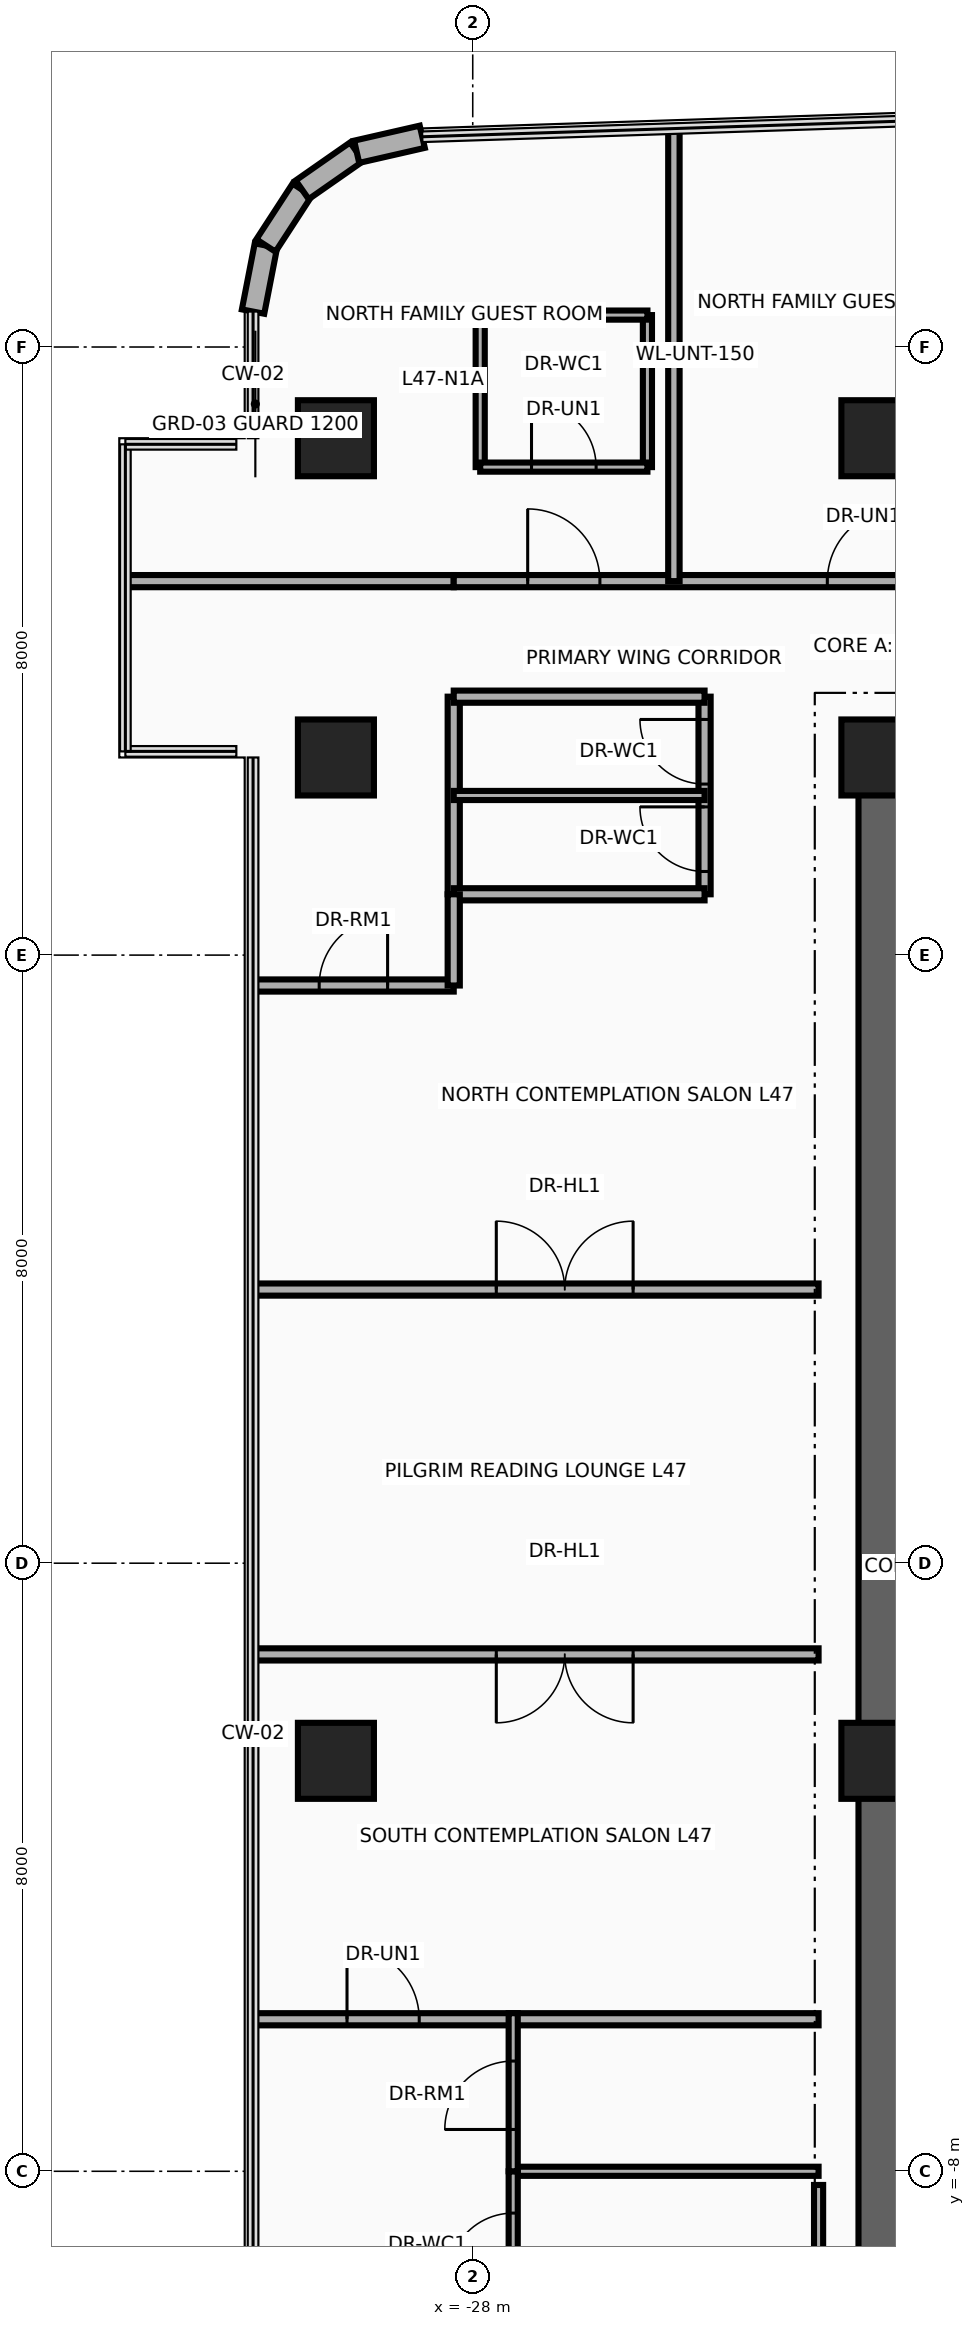
"""IFC4 building model, lengths in metres.
Left out: names, types, materials, properties, quantities, classifications, styles, units other than length and angle.
Written with IfcOpenShell. Run it as: python <this file> out.ifc"""

import sys

from ifc_helpers import new_model, si_unit, direction, frame, frame_2d, origin, origin_2d, place, context, subcontext, project, spatial, rectangle, extrude, source, transform, mapped, element, fill, save


model = new_model("IFC4")
c1 = context("Model", 3, precision=1e-05, world=origin(), true_north=direction((0.0, 1.0)))
c2 = subcontext(c1, "Body", "Model", "MODEL_VIEW")
j1 = project(units=[si_unit("LENGTHUNIT", "METRE"), si_unit("PLANEANGLEUNIT", "RADIAN")], contexts=[c1])
p1 = place(None, origin())
s1 = spatial("IfcSite", under=j1, at=p1, CompositionType="ELEMENT")
p2 = place(p1, origin())
s2 = spatial("IfcBuilding", under=s1, at=p2, CompositionType="ELEMENT")
p3 = place(p2, frame((0.0, 0.0, 184.45)))
s3 = spatial("IfcBuildingStorey", under=s2, at=p3, CompositionType="ELEMENT", Elevation=184.45)
p4 = place(p3, frame((-22.65, -11.075, 0.0), z_axis=(0.0, 0.0, 1.0), x_axis=(0.0, 1.0, 0.0)))
e1 = element("IfcWall", 1, at=p4, inside=s3, PredefinedType="SHEAR", context=c2, shape_type="SweptSolid", body=[
    extrude(rectangle(XDim=22.15, YDim=0.55, at=frame_2d((11.075, 0.0))), origin(), (0.0, 0.0, 1.0), 3.63),
])
p5 = place(p3, frame((-22.65, 10.8, 0.0), z_axis=(0.0, 0.0, 1.0), x_axis=(1.0, 0.0, 0.0)))
e2 = element("IfcWall", 2, at=p5, inside=s3, PredefinedType="SHEAR", context=c2, shape_type="SweptSolid", body=[
    extrude(rectangle(XDim=10.25, YDim=0.55, at=frame_2d((5.125, 0.0))), origin(), (0.0, 0.0, 1.0), 3.63),
])
m1 = source(origin(), c2, "Body", "SweptSolid", [
    extrude(rectangle(XDim=1.0, YDim=1.0, at=origin_2d()), origin(), (0.0, 0.0, 1.0), 3.95),
])
for number, where, z_axis, x_axis in (
    (3, (-29.8, -2.6, 0.0), (0.0, 0.0, 1.0), (1.0, 0.0, 0.0)),
    (4, (-22.65, -2.6, 0.0), (0.0, 0.0, 1.0), (1.0, 0.0, 0.0)),
    (5, (-29.8, 10.6, 0.0), (0.0, 0.0, 1.0), (1.0, 0.0, 0.0)),
    (6, (-22.65, 10.6, 0.0), (0.0, 0.0, 1.0), (1.0, 0.0, 0.0)),
    (7, (-29.8, 14.8, 0.0), (0.0, 0.0, 1.0), (1.0, 0.0, 0.0)),
    (8, (-22.65, 14.8, 0.0), (0.0, 0.0, 1.0), (1.0, 0.0, 0.0)),
):
    element("IfcColumn", number, at=place(p3, frame(where, z_axis=z_axis, x_axis=x_axis)), inside=s3, PredefinedType="COLUMN", context=c2, shape_type="MappedRepresentation", body=[
        mapped(m1, transform((0.0, 0.0, 0.0), x_axis=(1.0, 0.0, 0.0), y_axis=(0.0, 1.0, 0.0), z_axis=(0.0, 0.0, 1.0), scale=1.0)),
    ])
p6 = place(p3, frame((-30.89, 16.466, 0.0), z_axis=(0.0, 0.0, 1.0), x_axis=(0.191128020887, 0.981565117367, 0.0)))
e9 = element("IfcWall", 9, at=p6, inside=s3, PredefinedType="SOLIDWALL", context=c2, shape_type="SweptSolid", body=[
    extrude(rectangle(XDim=0.885, YDim=0.3, at=frame_2d((0.443, 0.0))), origin(), (0.0, 0.0, 1.0), 3.63),
])
p7 = place(p3, frame((-30.721, 17.335, 0.0), z_axis=(0.0, 0.0, 1.0), x_axis=(0.545322000684, 0.838226649284, 0.0)))
e10 = element("IfcWall", 10, at=p7, inside=s3, PredefinedType="SOLIDWALL", context=c2, shape_type="SweptSolid", body=[
    extrude(rectangle(XDim=0.874, YDim=0.3, at=frame_2d((0.437, 0.0))), origin(), (0.0, 0.0, 1.0), 3.63),
])
p8 = place(p3, frame((-30.244, 18.068, 0.0), z_axis=(0.0, 0.0, 1.0), x_axis=(0.820005059444, 0.572356272339, 0.0)))
e11 = element("IfcWall", 11, at=p8, inside=s3, PredefinedType="SOLIDWALL", context=c2, shape_type="SweptSolid", body=[
    extrude(rectangle(XDim=0.875, YDim=0.3, at=frame_2d((0.437, 0.0))), origin(), (0.0, 0.0, 1.0), 3.63),
])
p9 = place(p3, frame((-29.527, 18.569, 0.0), z_axis=(0.0, 0.0, 1.0), x_axis=(0.974798570829, 0.223086858218, 0.0)))
e12 = element("IfcWall", 12, at=p9, inside=s3, PredefinedType="SOLIDWALL", context=c2, shape_type="SweptSolid", body=[
    extrude(rectangle(XDim=0.885, YDim=0.3, at=frame_2d((0.443, 0.0))), origin(), (0.0, 0.0, 1.0), 3.63),
])
p10 = place(p3, frame((-28.25, 8.8, 0.0), z_axis=(0.0, 0.0, 1.0), x_axis=(0.0, 1.0, 0.0)))
e13 = element("IfcWall", 13, at=p10, inside=s3, PredefinedType="PARTITIONING", context=c2, shape_type="SweptSolid", body=[
    extrude(rectangle(XDim=2.6, YDim=0.16, at=frame_2d((1.3, 0.0))), origin(), (0.0, 0.0, 1.0), 2.665),
])
p11 = place(p3, frame((-24.95, 8.8, 0.0), z_axis=(0.0, 0.0, 1.0), x_axis=(0.0, 1.0, 0.0)))
e14 = element("IfcWall", 14, at=p11, inside=s3, PredefinedType="PARTITIONING", context=c2, shape_type="SweptSolid", body=[
    extrude(rectangle(XDim=2.6, YDim=0.16, at=frame_2d((1.3, 0.0))), origin(), (0.0, 0.0, 1.0), 2.665),
])
p12 = place(p11, frame((0.3, 0.0, 0.0)))
e15 = element("IfcOpeningElement", 15, at=p12, cuts=e14, PredefinedType="OPENING", context=c2, shape_type="SweptSolid", body=[
    extrude(rectangle(XDim=0.85, YDim=2.1, at=frame_2d((0.425, 1.05))), frame((0.0, 0.095, 0.0), z_axis=(0.0, -1.0, 0.0), x_axis=(1.0, 0.0, 0.0)), (0.0, 0.0, 1.0), 0.19),
])
p13 = place(p11, frame((1.45, 0.0, 0.0)))
e16 = element("IfcOpeningElement", 16, at=p13, cuts=e14, PredefinedType="OPENING", context=c2, shape_type="SweptSolid", body=[
    extrude(rectangle(XDim=0.85, YDim=2.1, at=frame_2d((0.425, 1.05))), frame((0.0, 0.095, 0.0), z_axis=(0.0, -1.0, 0.0), x_axis=(1.0, 0.0, 0.0)), (0.0, 0.0, 1.0), 0.19),
])
for number, where, z_axis, x_axis in (
    (17, (-28.25, 8.8, 0.0), (0.0, 0.0, 1.0), (1.0, 0.0, 0.0)),
    (18, (-28.25, 11.4, 0.0), (0.0, 0.0, 1.0), (1.0, 0.0, 0.0)),
):
    element("IfcWall", number, at=place(p3, frame(where, z_axis=z_axis, x_axis=x_axis)), inside=s3, PredefinedType="PARTITIONING", context=c2, shape_type="SweptSolid", body=[
        extrude(rectangle(XDim=3.3, YDim=0.16, at=frame_2d((1.65, 0.0))), origin(), (0.0, 0.0, 1.0), 3.63),
    ])
p14 = place(p3, frame((-28.25, 10.1, 0.0), z_axis=(0.0, 0.0, 1.0), x_axis=(1.0, 0.0, 0.0)))
e19 = element("IfcWall", 19, at=p14, inside=s3, PredefinedType="PARTITIONING", context=c2, shape_type="SweptSolid", body=[
    extrude(rectangle(XDim=3.3, YDim=0.12, at=frame_2d((1.65, 0.0))), origin(), (0.0, 0.0, 1.0), 3.63),
])
p15 = place(p3, frame((-30.89, -6.0, 0.0), z_axis=(0.0, 0.0, 1.0), x_axis=(1.0, 0.0, 0.0)))
e20 = element("IfcWall", 20, at=p15, inside=s3, PredefinedType="PARTITIONING", context=c2, shape_type="SweptSolid", body=[
    extrude(rectangle(XDim=7.44, YDim=0.16, at=frame_2d((3.72, 0.0))), origin(), (0.0, 0.0, 1.0), 3.076),
])
p16 = place(p15, frame((1.236, 0.0, 0.0)))
e21 = element("IfcOpeningElement", 21, at=p16, cuts=e20, PredefinedType="OPENING", context=c2, shape_type="SweptSolid", body=[
    extrude(rectangle(XDim=0.95, YDim=2.15, at=frame_2d((0.475, 1.075))), frame((0.0, 0.095, 0.0), z_axis=(0.0, -1.0, 0.0), x_axis=(1.0, 0.0, 0.0)), (0.0, 0.0, 1.0), 0.19),
])
p17 = place(p3, frame((-30.89, 7.6, 0.0), z_axis=(0.0, 0.0, 1.0), x_axis=(1.0, 0.0, 0.0)))
e22 = element("IfcWall", 22, at=p17, inside=s3, PredefinedType="PARTITIONING", context=c2, shape_type="SweptSolid", body=[
    extrude(rectangle(XDim=2.64, YDim=0.16, at=frame_2d((1.32, 0.0))), origin(), (0.0, 0.0, 1.0), 3.076),
])
p18 = place(p17, frame((0.87, 0.0, 0.0)))
e23 = element("IfcOpeningElement", 23, at=p18, cuts=e22, PredefinedType="OPENING", context=c2, shape_type="SweptSolid", body=[
    extrude(rectangle(XDim=0.9, YDim=2.1, at=frame_2d((0.45, 1.05))), frame((0.0, 0.095, 0.0), z_axis=(0.0, -1.0, 0.0), x_axis=(1.0, 0.0, 0.0)), (0.0, 0.0, 1.0), 0.19),
])
p19 = place(p3, frame((-28.25, 7.6, 0.0), z_axis=(0.0, 0.0, 1.0), x_axis=(0.0, 1.0, 0.0)))
e24 = element("IfcWall", 24, at=p19, inside=s3, PredefinedType="PARTITIONING", context=c2, shape_type="SweptSolid", body=[
    extrude(rectangle(XDim=1.2, YDim=0.16, at=frame_2d((0.6, 0.0))), origin(), (0.0, 0.0, 1.0), 3.158),
])
p20 = place(p3, frame((-27.468, -8.0, 0.0), z_axis=(0.0, 0.0, 1.0), x_axis=(1.0, 0.0, 0.0)))
e25 = element("IfcWall", 25, at=p20, inside=s3, PredefinedType="PARTITIONING", context=c2, shape_type="SweptSolid", body=[
    extrude(rectangle(XDim=4.018, YDim=0.12, at=frame_2d((2.009, 0.0))), origin(), (0.0, 0.0, 1.0), 3.63),
])
p21 = place(p3, frame((-27.468, -9.95, 0.0), z_axis=(0.0, 0.0, 1.0), x_axis=(0.0, 1.0, 0.0)))
e26 = element("IfcWall", 26, at=p21, inside=s3, PredefinedType="PARTITIONING", context=c2, shape_type="SweptSolid", body=[
    extrude(rectangle(XDim=1.95, YDim=0.12, at=frame_2d((0.975, 0.0))), origin(), (0.0, 0.0, 1.0), 3.158),
])
p22 = place(p21, frame((0.55, 0.0, 0.0)))
e27 = element("IfcOpeningElement", 27, at=p22, cuts=e26, PredefinedType="OPENING", context=c2, shape_type="SweptSolid", body=[
    extrude(rectangle(XDim=0.85, YDim=2.1, at=frame_2d((0.425, 1.05))), frame((0.0, 0.075, 0.0), z_axis=(0.0, -1.0, 0.0), x_axis=(1.0, 0.0, 0.0)), (0.0, 0.0, 1.0), 0.15),
])
p23 = place(p3, frame((-27.468, -8.0, 0.0), z_axis=(0.0, 0.0, 1.0), x_axis=(0.0, 1.0, 0.0)))
e28 = element("IfcWall", 28, at=p23, inside=s3, PredefinedType="PARTITIONING", context=c2, shape_type="SweptSolid", body=[
    extrude(rectangle(XDim=2.08, YDim=0.12, at=frame_2d((1.04, 0.0))), origin(), (0.0, 0.0, 1.0), 3.158),
])
p24 = place(p23, frame((0.55, 0.0, 0.0)))
e29 = element("IfcOpeningElement", 29, at=p24, cuts=e28, PredefinedType="OPENING", context=c2, shape_type="SweptSolid", body=[
    extrude(rectangle(XDim=0.9, YDim=2.1, at=frame_2d((0.45, 1.05))), frame((0.0, 0.075, 0.0), z_axis=(0.0, -1.0, 0.0), x_axis=(1.0, 0.0, 0.0)), (0.0, 0.0, 1.0), 0.15),
])
p25 = place(p3, frame((-23.45, -9.77, 0.0), z_axis=(0.0, 0.0, 1.0), x_axis=(0.0, 1.0, 0.0)))
e30 = element("IfcWall", 30, at=p25, inside=s3, PredefinedType="PARTITIONING", context=c2, shape_type="SweptSolid", body=[
    extrude(rectangle(XDim=1.59, YDim=0.12, at=frame_2d((0.795, 0.0))), origin(), (0.0, 0.0, 1.0), 3.158),
])
p26 = place(p3, frame((-30.89, -1.2, 0.0), z_axis=(0.0, 0.0, 1.0), x_axis=(1.0, 0.0, 0.0)))
e31 = element("IfcWall", 31, at=p26, inside=s3, PredefinedType="PARTITIONING", context=c2, shape_type="SweptSolid", body=[
    extrude(rectangle(XDim=7.44, YDim=0.16, at=frame_2d((3.72, 0.0))), origin(), (0.0, 0.0, 1.0), 3.076),
])
p27 = place(p26, frame((3.2, 0.0, 0.0)))
e32 = element("IfcOpeningElement", 32, at=p27, cuts=e31, PredefinedType="OPENING", context=c2, shape_type="SweptSolid", body=[
    extrude(rectangle(XDim=1.8, YDim=2.15, at=frame_2d((0.9, 1.075))), frame((0.0, 0.095, 0.0), z_axis=(0.0, -1.0, 0.0), x_axis=(1.0, 0.0, 0.0)), (0.0, 0.0, 1.0), 0.19),
])
p28 = place(p3, frame((-30.89, 3.6, 0.0), z_axis=(0.0, 0.0, 1.0), x_axis=(1.0, 0.0, 0.0)))
e33 = element("IfcWall", 33, at=p28, inside=s3, PredefinedType="PARTITIONING", context=c2, shape_type="SweptSolid", body=[
    extrude(rectangle(XDim=7.44, YDim=0.16, at=frame_2d((3.72, 0.0))), origin(), (0.0, 0.0, 1.0), 3.076),
])
p29 = place(p28, frame((3.2, 0.0, 0.0)))
e34 = element("IfcOpeningElement", 34, at=p29, cuts=e33, PredefinedType="OPENING", context=c2, shape_type="SweptSolid", body=[
    extrude(rectangle(XDim=1.8, YDim=2.15, at=frame_2d((0.9, 1.075))), frame((0.0, 0.095, 0.0), z_axis=(0.0, -1.0, 0.0), x_axis=(1.0, 0.0, 0.0)), (0.0, 0.0, 1.0), 0.19),
])
p30 = place(p3, frame((-32.54, 12.92, 0.0), z_axis=(0.0, 0.0, 1.0), x_axis=(1.0, 0.0, 0.0)))
e35 = element("IfcWall", 35, at=p30, inside=s3, PredefinedType="PARTITIONING", context=c2, shape_type="SweptSolid", body=[
    extrude(rectangle(XDim=4.29, YDim=0.16, at=frame_2d((2.145, 0.0))), origin(), (0.0, 0.0, 1.0), 3.076),
])
p31 = place(p3, frame((-28.25, 12.92, 0.0), z_axis=(0.0, 0.0, 1.0), x_axis=(1.0, 0.0, 0.0)))
e36 = element("IfcWall", 36, at=p31, inside=s3, PredefinedType="PARTITIONING", context=c2, shape_type="SweptSolid", body=[
    extrude(rectangle(XDim=36.75, YDim=0.16, at=frame_2d((18.375, 0.0))), origin(), (0.0, 0.0, 1.0), 2.615),
])
p32 = place(p31, frame((0.973, 0.0, 0.0)))
e37 = element("IfcOpeningElement", 37, at=p32, cuts=e36, PredefinedType="OPENING", context=c2, shape_type="SweptSolid", body=[
    extrude(rectangle(XDim=0.95, YDim=2.15, at=frame_2d((0.475, 1.075))), frame((0.0, 0.095, 0.0), z_axis=(0.0, -1.0, 0.0), x_axis=(1.0, 0.0, 0.0)), (0.0, 0.0, 1.0), 0.19),
])
p33 = place(p31, frame((4.915, 0.0, 0.0)))
e38 = element("IfcOpeningElement", 38, at=p33, cuts=e36, PredefinedType="OPENING", context=c2, shape_type="SweptSolid", body=[
    extrude(rectangle(XDim=0.95, YDim=2.15, at=frame_2d((0.475, 1.075))), frame((0.0, 0.095, 0.0), z_axis=(0.0, -1.0, 0.0), x_axis=(1.0, 0.0, 0.0)), (0.0, 0.0, 1.0), 0.19),
])
p34 = place(p31, frame((13.5, 0.0, 0.0)))
e39 = element("IfcOpeningElement", 39, at=p34, cuts=e36, PredefinedType="OPENING", context=c2, shape_type="SweptSolid", body=[
    extrude(rectangle(XDim=0.95, YDim=2.15, at=frame_2d((0.475, 1.075))), frame((0.0, 0.095, 0.0), z_axis=(0.0, -1.0, 0.0), x_axis=(1.0, 0.0, 0.0)), (0.0, 0.0, 1.0), 0.19),
])
p35 = place(p31, frame((26.834, 0.0, 0.0)))
e40 = element("IfcOpeningElement", 40, at=p35, cuts=e36, PredefinedType="OPENING", context=c2, shape_type="SweptSolid", body=[
    extrude(rectangle(XDim=0.95, YDim=2.15, at=frame_2d((0.475, 1.075))), frame((0.0, 0.095, 0.0), z_axis=(0.0, -1.0, 0.0), x_axis=(1.0, 0.0, 0.0)), (0.0, 0.0, 1.0), 0.19),
])
p36 = place(p3, frame((-25.354, 12.92, 0.0), z_axis=(0.0, 0.0, 1.0), x_axis=(0.0, 1.0, 0.0)))
e41 = element("IfcWall", 41, at=p36, inside=s3, PredefinedType="PARTITIONING", context=c2, shape_type="SweptSolid", body=[
    extrude(rectangle(XDim=5.954, YDim=0.15, at=frame_2d((2.977, 0.0))), origin(), (0.0, 0.0, 1.0), 2.665),
])
for number, where, z_axis, x_axis in (
    (42, (-27.902, 14.42, 0.0), (0.0, 0.0, 1.0), (0.0, 1.0, 0.0)),
    (43, (-25.702, 14.42, 0.0), (0.0, 0.0, 1.0), (0.0, 1.0, 0.0)),
):
    element("IfcWall", number, at=place(p3, frame(where, z_axis=z_axis, x_axis=x_axis)), inside=s3, PredefinedType="PARTITIONING", context=c2, shape_type="SweptSolid", body=[
        extrude(rectangle(XDim=2.0, YDim=0.12, at=frame_2d((1.0, 0.0))), origin(), (0.0, 0.0, 1.0), 2.665),
    ])
p37 = place(p3, frame((-27.902, 16.42, 0.0), z_axis=(0.0, 0.0, 1.0), x_axis=(1.0, 0.0, 0.0)))
e44 = element("IfcWall", 44, at=p37, inside=s3, PredefinedType="PARTITIONING", context=c2, shape_type="SweptSolid", body=[
    extrude(rectangle(XDim=2.2, YDim=0.12, at=frame_2d((1.1, 0.0))), origin(), (0.0, 0.0, 1.0), 3.63),
])
p38 = place(p3, frame((-27.902, 14.42, 0.0), z_axis=(0.0, 0.0, 1.0), x_axis=(1.0, 0.0, 0.0)))
e45 = element("IfcWall", 45, at=p38, inside=s3, PredefinedType="PARTITIONING", context=c2, shape_type="SweptSolid", body=[
    extrude(rectangle(XDim=2.2, YDim=0.12, at=frame_2d((1.1, 0.0))), origin(), (0.0, 0.0, 1.0), 3.63),
])
p39 = place(p38, frame((0.675, 0.0, 0.0)))
e46 = element("IfcOpeningElement", 46, at=p39, cuts=e45, PredefinedType="OPENING", context=c2, shape_type="SweptSolid", body=[
    extrude(rectangle(XDim=0.85, YDim=2.1, at=frame_2d((0.425, 1.05))), frame((0.0, 0.075, 0.0), z_axis=(0.0, -1.0, 0.0), x_axis=(1.0, 0.0, 0.0)), (0.0, 0.0, 1.0), 0.15),
])
p40 = place(p12, origin())
e47 = element("IfcDoor", 47, at=p40, inside=s3, OperationType="SINGLE_SWING_RIGHT", PredefinedType="DOOR", context=c2, shape_type="SweptSolid", body=[
    extrude(rectangle(XDim=0.85, YDim=2.1, at=frame_2d((0.425, 1.05))), frame((0.0, 0.025, 0.0), z_axis=(0.0, -1.0, 0.0), x_axis=(1.0, 0.0, 0.0)), (0.0, 0.0, 1.0), 0.05),
])
fill(e15, e47)
p41 = place(p13, origin())
e48 = element("IfcDoor", 48, at=p41, inside=s3, OperationType="SINGLE_SWING_LEFT", PredefinedType="DOOR", context=c2, shape_type="SweptSolid", body=[
    extrude(rectangle(XDim=0.85, YDim=2.1, at=frame_2d((0.425, 1.05))), frame((0.0, 0.025, 0.0), z_axis=(0.0, -1.0, 0.0), x_axis=(1.0, 0.0, 0.0)), (0.0, 0.0, 1.0), 0.05),
])
fill(e16, e48)
p42 = place(p16, origin())
e49 = element("IfcDoor", 49, at=p42, inside=s3, OperationType="SINGLE_SWING_RIGHT", PredefinedType="DOOR", context=c2, shape_type="SweptSolid", body=[
    extrude(rectangle(XDim=0.95, YDim=2.15, at=frame_2d((0.475, 1.075))), frame((0.0, 0.025, 0.0), z_axis=(0.0, -1.0, 0.0), x_axis=(1.0, 0.0, 0.0)), (0.0, 0.0, 1.0), 0.05),
])
fill(e21, e49)
p43 = place(p22, origin())
e50 = element("IfcDoor", 50, at=p43, inside=s3, OperationType="SINGLE_SWING_LEFT", PredefinedType="DOOR", context=c2, shape_type="SweptSolid", body=[
    extrude(rectangle(XDim=0.85, YDim=2.1, at=frame_2d((0.425, 1.05))), frame((0.0, 0.025, 0.0), z_axis=(0.0, -1.0, 0.0), x_axis=(1.0, 0.0, 0.0)), (0.0, 0.0, 1.0), 0.05),
])
fill(e27, e50)
p44 = place(p24, origin())
e51 = element("IfcDoor", 51, at=p44, inside=s3, OperationType="SINGLE_SWING_RIGHT", PredefinedType="DOOR", context=c2, shape_type="SweptSolid", body=[
    extrude(rectangle(XDim=0.9, YDim=2.1, at=frame_2d((0.45, 1.05))), frame((0.0, 0.025, 0.0), z_axis=(0.0, -1.0, 0.0), x_axis=(1.0, 0.0, 0.0)), (0.0, 0.0, 1.0), 0.05),
])
fill(e29, e51)
p45 = place(p18, origin())
e52 = element("IfcDoor", 52, at=p45, inside=s3, OperationType="SINGLE_SWING_RIGHT", PredefinedType="DOOR", context=c2, shape_type="SweptSolid", body=[
    extrude(rectangle(XDim=0.9, YDim=2.1, at=frame_2d((0.45, 1.05))), frame((0.0, 0.025, 0.0), z_axis=(0.0, -1.0, 0.0), x_axis=(1.0, 0.0, 0.0)), (0.0, 0.0, 1.0), 0.05),
])
fill(e23, e52)
p46 = place(p27, frame((1.8, 0.0, 0.0), z_axis=(0.0, 0.0, 1.0), x_axis=(-1.0, 0.0, 0.0)))
e53 = element("IfcDoor", 53, at=p46, inside=s3, OperationType="DOUBLE_DOOR_SINGLE_SWING", PredefinedType="DOOR", context=c2, shape_type="SweptSolid", body=[
    extrude(rectangle(XDim=1.8, YDim=2.15, at=frame_2d((0.9, 1.075))), frame((0.0, 0.025, 0.0), z_axis=(0.0, -1.0, 0.0), x_axis=(1.0, 0.0, 0.0)), (0.0, 0.0, 1.0), 0.05),
])
fill(e32, e53)
p47 = place(p29, origin())
e54 = element("IfcDoor", 54, at=p47, inside=s3, OperationType="DOUBLE_DOOR_SINGLE_SWING", PredefinedType="DOOR", context=c2, shape_type="SweptSolid", body=[
    extrude(rectangle(XDim=1.8, YDim=2.15, at=frame_2d((0.9, 1.075))), frame((0.0, 0.025, 0.0), z_axis=(0.0, -1.0, 0.0), x_axis=(1.0, 0.0, 0.0)), (0.0, 0.0, 1.0), 0.05),
])
fill(e34, e54)
p48 = place(p32, origin())
e55 = element("IfcDoor", 55, at=p48, inside=s3, OperationType="SINGLE_SWING_RIGHT", PredefinedType="DOOR", context=c2, shape_type="SweptSolid", body=[
    extrude(rectangle(XDim=0.95, YDim=2.15, at=frame_2d((0.475, 1.075))), frame((0.0, 0.025, 0.0), z_axis=(0.0, -1.0, 0.0), x_axis=(1.0, 0.0, 0.0)), (0.0, 0.0, 1.0), 0.05),
])
fill(e37, e55)
p49 = place(p39, origin())
e56 = element("IfcDoor", 56, at=p49, inside=s3, OperationType="SINGLE_SWING_LEFT", PredefinedType="DOOR", context=c2, shape_type="SweptSolid", body=[
    extrude(rectangle(XDim=0.85, YDim=2.1, at=frame_2d((0.425, 1.05))), frame((0.0, 0.025, 0.0), z_axis=(0.0, -1.0, 0.0), x_axis=(1.0, 0.0, 0.0)), (0.0, 0.0, 1.0), 0.05),
])
fill(e46, e56)
p50 = place(p33, origin())
e57 = element("IfcDoor", 57, at=p50, inside=s3, OperationType="SINGLE_SWING_RIGHT", PredefinedType="DOOR", context=c2, shape_type="SweptSolid", body=[
    extrude(rectangle(XDim=0.95, YDim=2.15, at=frame_2d((0.475, 1.075))), frame((0.0, 0.025, 0.0), z_axis=(0.0, -1.0, 0.0), x_axis=(1.0, 0.0, 0.0)), (0.0, 0.0, 1.0), 0.05),
])
fill(e38, e57)
save(model, sys.argv[1])
